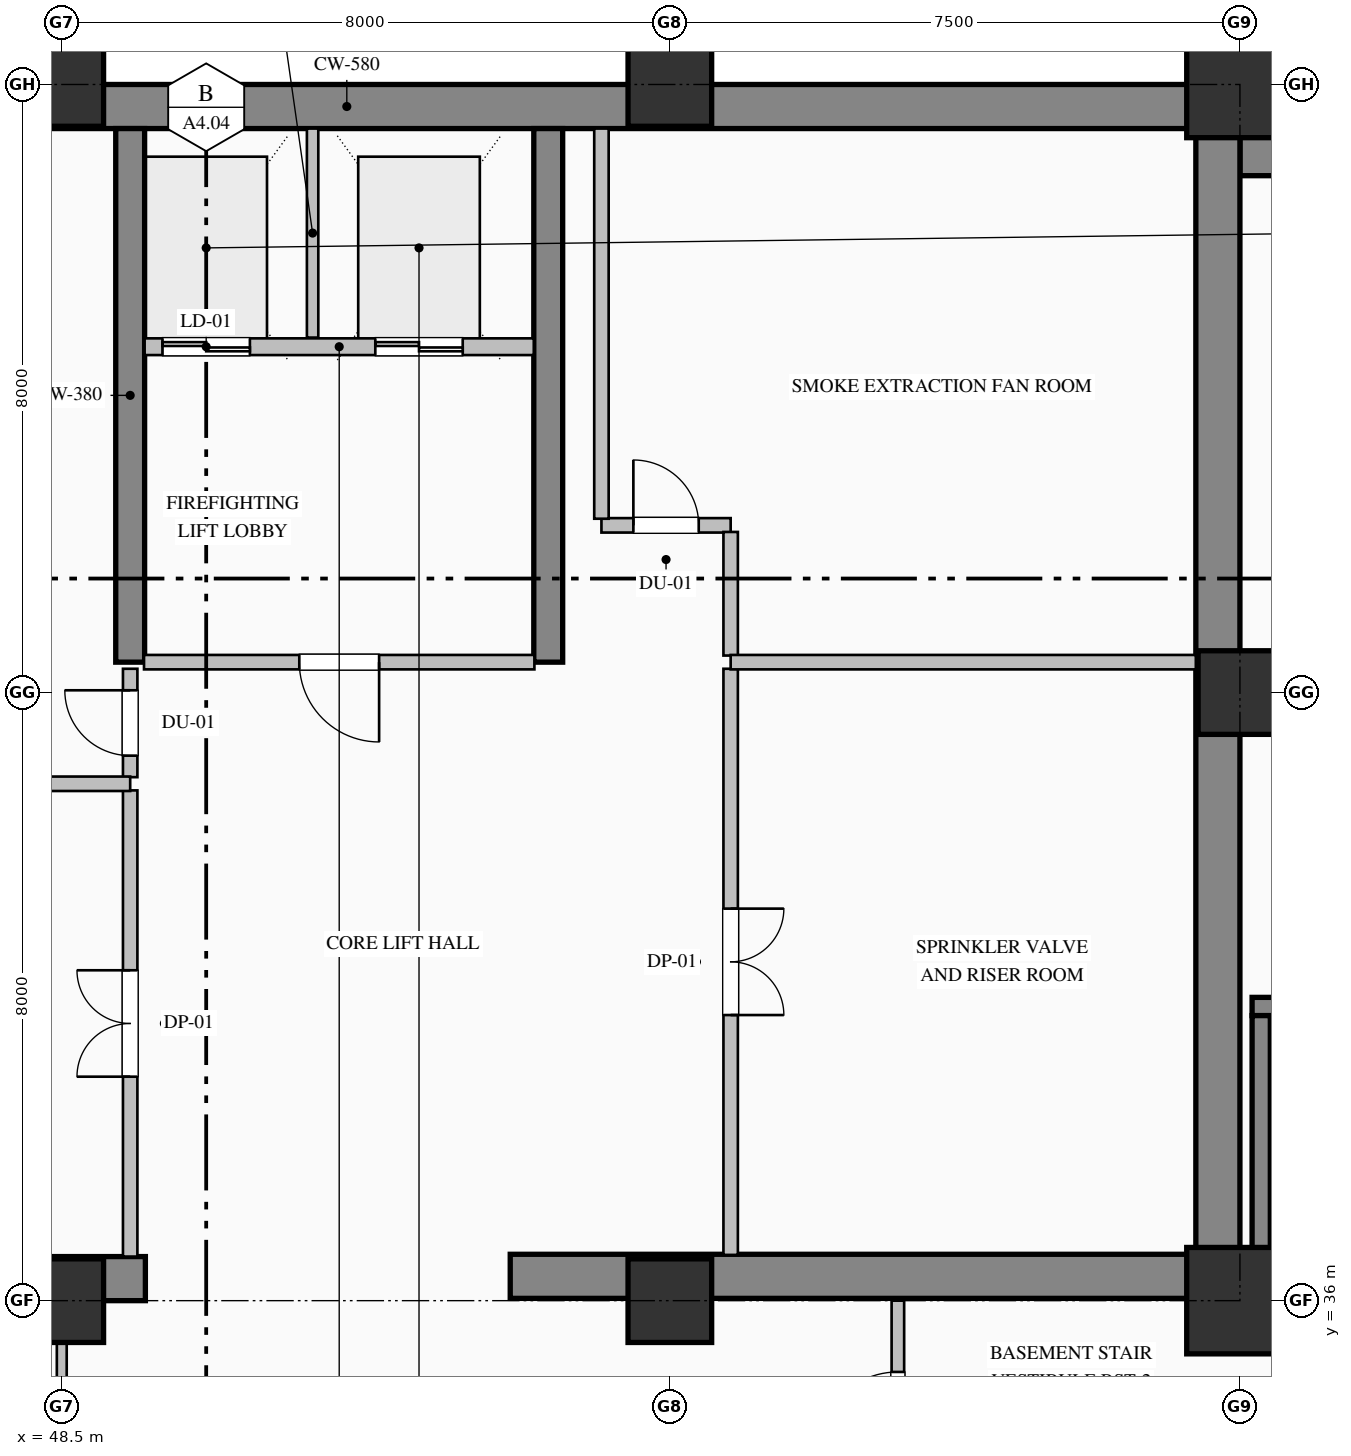
"""IFC4 building model, lengths in metres.
Left out: names, types, materials, properties, quantities, classifications, styles, units other than length and angle.
Written with IfcOpenShell. Run it as: python <this file> out.ifc"""

import sys

from ifc_helpers import new_model, si_unit, direction, frame, frame_2d, origin, origin_2d, place, context, subcontext, project, spatial, rectangle, hollow_rectangle, extrude, element, fill, save


model = new_model("IFC4")
c1 = context("Model", 3, precision=1e-05, world=origin(), true_north=direction((0.0, 1.0)))
c2 = subcontext(c1, "Body", "Model", "MODEL_VIEW")
j1 = project(units=[si_unit("LENGTHUNIT", "METRE"), si_unit("PLANEANGLEUNIT", "RADIAN")], contexts=[c1])
p1 = place(None, origin())
s1 = spatial("IfcSite", under=j1, at=p1, CompositionType="ELEMENT")
p2 = place(p1, origin())
s2 = spatial("IfcBuilding", under=s1, at=p2, CompositionType="ELEMENT")
p3 = place(p2, frame((0.0, 0.0, -13.8)))
s3 = spatial("IfcBuildingStorey", under=s2, at=p3, CompositionType="ELEMENT", Elevation=-13.8)
p4 = place(p3, frame((64.0, 51.4, -0.5), z_axis=(0.0, 0.0, 1.0), x_axis=(1.0, 0.0, 0.0)))
e1 = element("IfcWall", 1, at=p4, inside=s3, PredefinedType="USERDEFINED", context=c2, shape_type="SweptSolid", body=[
    extrude(rectangle(XDim=9.2, YDim=1.2, at=frame_2d((4.6, 0.0))), origin(), (0.0, 0.0, 1.0), 5.1),
])
p5 = place(p3, frame((40.5, 51.71, -0.5), z_axis=(0.0, 0.0, 1.0), x_axis=(1.0, 0.0, 0.0)))
e2 = element("IfcWall", 2, at=p5, inside=s3, PredefinedType="SHEAR", context=c2, shape_type="SweptSolid", body=[
    extrude(rectangle(XDim=23.5, YDim=0.58, at=frame_2d((11.75, 0.0))), origin(), (0.0, 0.0, 1.0), 4.74),
])
p6 = place(p3, frame((63.71, 36.32, -0.5), z_axis=(0.0, 0.0, 1.0), x_axis=(0.0, 1.0, 0.0)))
e3 = element("IfcWall", 3, at=p6, inside=s3, PredefinedType="SHEAR", context=c2, shape_type="SweptSolid", body=[
    extrude(rectangle(XDim=15.1, YDim=0.58, at=frame_2d((7.55, 0.0))), origin(), (0.0, 0.0, 1.0), 4.74),
])
p7 = place(p3, frame((40.5, 36.29, -0.5), z_axis=(0.0, 0.0, 1.0), x_axis=(1.0, 0.0, 0.0)))
e4 = element("IfcWall", 4, at=p7, inside=s3, PredefinedType="SHEAR", context=c2, shape_type="SweptSolid", body=[
    extrude(rectangle(XDim=9.1, YDim=0.58, at=frame_2d((4.55, 0.0))), origin(), (0.0, 0.0, 1.0), 4.74),
])
p8 = place(p3, frame((54.4, 36.32, -0.5), z_axis=(0.0, 0.0, 1.0), x_axis=(1.0, 0.0, 0.0)))
e5 = element("IfcWall", 5, at=p8, inside=s3, PredefinedType="SHEAR", context=c2, shape_type="SweptSolid", body=[
    extrude(rectangle(XDim=9.6, YDim=0.58, at=frame_2d((4.8, 0.0))), origin(), (0.0, 0.0, 1.0), 5.1),
])
for number, where, z_axis, x_axis in (
    (6, (49.4, 44.4, -0.5), (0.0, 0.0, 1.0), (0.0, 1.0, 0.0)),
    (7, (54.9, 44.4, -0.5), (0.0, 0.0, 1.0), (0.0, 1.0, 0.0)),
):
    element("IfcWall", number, at=place(p3, frame(where, z_axis=z_axis, x_axis=x_axis)), inside=s3, PredefinedType="SHEAR", context=c2, shape_type="SweptSolid", body=[
        extrude(rectangle(XDim=7.02, YDim=0.38, at=frame_2d((3.51, 0.0))), origin(), (0.0, 0.0, 1.0), 4.74),
    ])
p9 = place(p3, frame((48.5, 36.0, -0.5), z_axis=(0.0, 0.0, 1.0), x_axis=(1.0, 0.0, 0.0)))
e8 = element("IfcColumn", 8, at=p9, inside=s3, PredefinedType="COLUMN", context=c2, shape_type="SweptSolid", body=[
    extrude(rectangle(XDim=1.1, YDim=1.1, at=origin_2d()), origin(), (0.0, 0.0, 1.0), 5.1),
])
p10 = place(p3, frame((48.5, 52.0, -0.5), z_axis=(0.0, 0.0, 1.0), x_axis=(1.0, 0.0, 0.0)))
e9 = element("IfcColumn", 9, at=p10, inside=s3, PredefinedType="COLUMN", context=c2, shape_type="SweptSolid", body=[
    extrude(hollow_rectangle(XDim=1.1, YDim=1.1, WallThickness=0.04, at=origin_2d()), origin(), (0.0, 0.0, 1.0), 5.1),
])
p11 = place(p3, frame((56.5, 36.0, -0.5), z_axis=(0.0, 0.0, 1.0), x_axis=(1.0, 0.0, 0.0)))
e10 = element("IfcColumn", 10, at=p11, inside=s3, PredefinedType="COLUMN", context=c2, shape_type="SweptSolid", body=[
    extrude(rectangle(XDim=1.1, YDim=1.1, at=origin_2d()), origin(), (0.0, 0.0, 1.0), 5.1),
])
p12 = place(p3, frame((56.5, 52.0, -0.5), z_axis=(0.0, 0.0, 1.0), x_axis=(1.0, 0.0, 0.0)))
e11 = element("IfcColumn", 11, at=p12, inside=s3, PredefinedType="COLUMN", context=c2, shape_type="SweptSolid", body=[
    extrude(hollow_rectangle(XDim=1.1, YDim=1.1, WallThickness=0.04, at=origin_2d()), origin(), (0.0, 0.0, 1.0), 5.1),
])
p13 = place(p3, frame((64.0, 36.0, -0.5), z_axis=(0.0, 0.0, 1.0), x_axis=(1.0, 0.0, 0.0)))
e12 = element("IfcColumn", 12, at=p13, inside=s3, PredefinedType="COLUMN", context=c2, shape_type="SweptSolid", body=[
    extrude(hollow_rectangle(XDim=1.4, YDim=1.4, WallThickness=0.05, at=origin_2d()), origin(), (0.0, 0.0, 1.0), 5.1),
])
p14 = place(p3, frame((64.0, 44.0, -0.5), z_axis=(0.0, 0.0, 1.0), x_axis=(1.0, 0.0, 0.0)))
e13 = element("IfcColumn", 13, at=p14, inside=s3, PredefinedType="COLUMN", context=c2, shape_type="SweptSolid", body=[
    extrude(rectangle(XDim=1.1, YDim=1.1, at=origin_2d()), origin(), (0.0, 0.0, 1.0), 5.1),
])
p15 = place(p3, frame((64.0, 52.0, -0.5), z_axis=(0.0, 0.0, 1.0), x_axis=(1.0, 0.0, 0.0)))
e14 = element("IfcColumn", 14, at=p15, inside=s3, PredefinedType="COLUMN", context=c2, shape_type="SweptSolid", body=[
    extrude(hollow_rectangle(XDim=1.4, YDim=1.4, WallThickness=0.05, at=origin_2d()), origin(), (0.0, 0.0, 1.0), 5.1),
])
p16 = place(p3, frame((64.16, 39.87, -0.5), z_axis=(0.0, 0.0, 1.0), x_axis=(1.0, 0.0, 0.0)))
e15 = element("IfcWall", 15, at=p16, inside=s3, PredefinedType="SOLIDWALL", context=c2, shape_type="SweptSolid", body=[
    extrude(rectangle(XDim=7.82, YDim=0.24, at=frame_2d((3.91, 0.0))), origin(), (0.0, 0.0, 1.0), 5.1),
])
p17 = place(p3, frame((71.98, 36.48, -0.5), z_axis=(0.0, 0.0, 1.0), x_axis=(-1.0, 0.0, 0.0)))
e16 = element("IfcWall", 16, at=p17, inside=s3, PredefinedType="SOLIDWALL", context=c2, shape_type="SweptSolid", body=[
    extrude(rectangle(XDim=7.82, YDim=0.24, at=frame_2d((3.91, 0.0))), origin(), (0.0, 0.0, 1.0), 5.1),
])
p18 = place(p17, frame((6.08, 0.0, 0.5)))
e17 = element("IfcOpeningElement", 17, at=p18, cuts=e16, PredefinedType="OPENING", context=c2, shape_type="SweptSolid", body=[
    extrude(rectangle(XDim=1.15, YDim=2.2, at=frame_2d((0.575, 1.1))), frame((0.0, 0.13, 0.0), z_axis=(0.0, -1.0, 0.0), x_axis=(1.0, 0.0, 0.0)), (0.0, 0.0, 1.0), 0.26),
])
p19 = place(p3, frame((64.28, 39.75, -0.5), z_axis=(0.0, 0.0, 1.0), x_axis=(0.0, -1.0, 0.0)))
e18 = element("IfcWall", 18, at=p19, inside=s3, PredefinedType="SOLIDWALL", context=c2, shape_type="SweptSolid", body=[
    extrude(rectangle(XDim=3.15, YDim=0.24, at=frame_2d((1.575, 0.0))), origin(), (0.0, 0.0, 1.0), 5.1),
])
p20 = place(p3, frame((54.71, 48.55, 0.0), z_axis=(0.0, 0.0, 1.0), x_axis=(-1.0, 0.0, 0.0)))
e19 = element("IfcWall", 19, at=p20, inside=s3, PredefinedType="PARTITIONING", context=c2, shape_type="SweptSolid", body=[
    extrude(rectangle(XDim=5.12, YDim=0.22, at=frame_2d((2.56, 0.0))), origin(), (0.0, 0.0, 1.0), 4.24),
])
p21 = place(p20, frame((3.735, 0.0, 0.0)))
e20 = element("IfcOpeningElement", 20, at=p21, cuts=e19, PredefinedType="OPENING", context=c2, shape_type="SweptSolid", body=[
    extrude(rectangle(XDim=1.15, YDim=2.2, at=frame_2d((0.575, 1.1))), frame((0.0, 0.12, 0.0), z_axis=(0.0, -1.0, 0.0), x_axis=(1.0, 0.0, 0.0)), (0.0, 0.0, 1.0), 0.24),
])
p22 = place(p20, frame((0.935, 0.0, 0.0)))
e21 = element("IfcOpeningElement", 21, at=p22, cuts=e19, PredefinedType="OPENING", context=c2, shape_type="SweptSolid", body=[
    extrude(rectangle(XDim=1.15, YDim=2.2, at=frame_2d((0.575, 1.1))), frame((0.0, 0.12, 0.0), z_axis=(0.0, -1.0, 0.0), x_axis=(1.0, 0.0, 0.0)), (0.0, 0.0, 1.0), 0.24),
])
p23 = place(p3, frame((51.8, 48.67, 0.0), z_axis=(0.0, 0.0, 1.0), x_axis=(0.0, 1.0, 0.0)))
e22 = element("IfcWall", 22, at=p23, inside=s3, PredefinedType="PARTITIONING", context=c2, shape_type="SweptSolid", body=[
    extrude(rectangle(XDim=2.75, YDim=0.15, at=frame_2d((1.375, 0.0))), origin(), (0.0, 0.0, 1.0), 4.24),
])
p24 = place(p3, frame((54.718, 44.4, 0.0), z_axis=(0.0, 0.0, 1.0), x_axis=(-1.0, 0.0, 0.0)))
e23 = element("IfcWall", 23, at=p24, inside=s3, PredefinedType="PARTITIONING", context=c2, shape_type="SweptSolid", body=[
    extrude(rectangle(XDim=5.136, YDim=0.19, at=frame_2d((2.568, 0.0))), origin(), (0.0, 0.0, 1.0), 4.24),
])
p25 = place(p24, frame((2.043, 0.0, 0.0)))
e24 = element("IfcOpeningElement", 24, at=p25, cuts=e23, PredefinedType="OPENING", context=c2, shape_type="SweptSolid", body=[
    extrude(rectangle(XDim=1.05, YDim=2.15, at=frame_2d((0.525, 1.075))), frame((0.0, 0.105, 0.0), z_axis=(0.0, -1.0, 0.0), x_axis=(1.0, 0.0, 0.0)), (0.0, 0.0, 1.0), 0.21),
])
p26 = place(p3, frame((49.4, 36.58, 0.0), z_axis=(0.0, 0.0, 1.0), x_axis=(0.0, 1.0, 0.0)))
e25 = element("IfcWall", 25, at=p26, inside=s3, PredefinedType="PARTITIONING", context=c2, shape_type="SweptSolid", body=[
    extrude(rectangle(XDim=6.133, YDim=0.19, at=frame_2d((3.066, 0.0))), origin(), (0.0, 0.0, 1.0), 3.332),
])
p27 = place(p26, frame((2.366, 0.0, 0.0)))
e26 = element("IfcOpeningElement", 26, at=p27, cuts=e25, PredefinedType="OPENING", context=c2, shape_type="SweptSolid", body=[
    extrude(rectangle(XDim=1.4, YDim=2.25, at=frame_2d((0.7, 1.125))), frame((0.0, 0.105, 0.0), z_axis=(0.0, -1.0, 0.0), x_axis=(1.0, 0.0, 0.0)), (0.0, 0.0, 1.0), 0.21),
])
p28 = place(p3, frame((49.4, 42.887, 0.0), z_axis=(0.0, 0.0, 1.0), x_axis=(0.0, 1.0, 0.0)))
e27 = element("IfcWall", 27, at=p28, inside=s3, PredefinedType="PARTITIONING", context=c2, shape_type="SweptSolid", body=[
    extrude(rectangle(XDim=1.426, YDim=0.19, at=frame_2d((0.713, 0.0))), origin(), (0.0, 0.0, 1.0), 3.332),
])
p29 = place(p28, frame((0.283, 0.0, 0.0)))
e28 = element("IfcOpeningElement", 28, at=p29, cuts=e27, PredefinedType="OPENING", context=c2, shape_type="SweptSolid", body=[
    extrude(rectangle(XDim=0.86, YDim=2.1, at=frame_2d((0.43, 1.05))), frame((0.0, 0.105, 0.0), z_axis=(0.0, -1.0, 0.0), x_axis=(1.0, 0.0, 0.0)), (0.0, 0.0, 1.0), 0.21),
])
p30 = place(p3, frame((57.3, 44.313, 0.0), z_axis=(0.0, 0.0, 1.0), x_axis=(0.0, -1.0, 0.0)))
e29 = element("IfcWall", 29, at=p30, inside=s3, PredefinedType="PARTITIONING", context=c2, shape_type="SweptSolid", body=[
    extrude(rectangle(XDim=7.711, YDim=0.19, at=frame_2d((3.855, 0.0))), origin(), (0.0, 0.0, 1.0), 4.24),
])
p31 = place(p30, frame((3.156, 0.0, 0.0)))
e30 = element("IfcOpeningElement", 30, at=p31, cuts=e29, PredefinedType="OPENING", context=c2, shape_type="SweptSolid", body=[
    extrude(rectangle(XDim=1.4, YDim=2.25, at=frame_2d((0.7, 1.125))), frame((0.0, 0.105, 0.0), z_axis=(0.0, -1.0, 0.0), x_axis=(1.0, 0.0, 0.0)), (0.0, 0.0, 1.0), 0.21),
])
p32 = place(p3, frame((55.6, 46.2, 0.0), z_axis=(0.0, 0.0, 1.0), x_axis=(1.0, 0.0, 0.0)))
e31 = element("IfcWall", 31, at=p32, inside=s3, PredefinedType="PARTITIONING", context=c2, shape_type="SweptSolid", body=[
    extrude(rectangle(XDim=1.7, YDim=0.19, at=frame_2d((0.85, 0.0))), origin(), (0.0, 0.0, 1.0), 4.24),
])
p33 = place(p32, frame((0.42, 0.0, 0.0)))
e32 = element("IfcOpeningElement", 32, at=p33, cuts=e31, PredefinedType="OPENING", context=c2, shape_type="SweptSolid", body=[
    extrude(rectangle(XDim=0.86, YDim=2.1, at=frame_2d((0.43, 1.05))), frame((0.0, 0.105, 0.0), z_axis=(0.0, -1.0, 0.0), x_axis=(1.0, 0.0, 0.0)), (0.0, 0.0, 1.0), 0.21),
])
p34 = place(p3, frame((57.3, 46.113, 0.0), z_axis=(0.0, 0.0, 1.0), x_axis=(0.0, -1.0, 0.0)))
e33 = element("IfcWall", 33, at=p34, inside=s3, PredefinedType="PARTITIONING", context=c2, shape_type="SweptSolid", body=[
    extrude(rectangle(XDim=1.626, YDim=0.19, at=frame_2d((0.813, 0.0))), origin(), (0.0, 0.0, 1.0), 4.24),
])
p35 = place(p3, frame((41.08, 42.8, 0.0), z_axis=(0.0, 0.0, 1.0), x_axis=(1.0, 0.0, 0.0)))
e34 = element("IfcWall", 34, at=p35, inside=s3, PredefinedType="PARTITIONING", context=c2, shape_type="SweptSolid", body=[
    extrude(rectangle(XDim=8.32, YDim=0.19, at=frame_2d((4.16, 0.0))), origin(), (0.0, 0.0, 1.0), 4.24),
])
p36 = place(p3, frame((57.3, 44.4, 0.0), z_axis=(0.0, 0.0, 1.0), x_axis=(1.0, 0.0, 0.0)))
e35 = element("IfcWall", 35, at=p36, inside=s3, PredefinedType="PARTITIONING", context=c2, shape_type="SweptSolid", body=[
    extrude(rectangle(XDim=6.12, YDim=0.19, at=frame_2d((3.06, 0.0))), origin(), (0.0, 0.0, 1.0), 4.24),
])
p37 = place(p3, frame((55.6, 46.287, 0.0), z_axis=(0.0, 0.0, 1.0), x_axis=(0.0, 1.0, 0.0)))
e36 = element("IfcWall", 36, at=p37, inside=s3, PredefinedType="PARTITIONING", context=c2, shape_type="SweptSolid", body=[
    extrude(rectangle(XDim=5.133, YDim=0.19, at=frame_2d((2.566, 0.0))), origin(), (0.0, 0.0, 1.0), 4.24),
])
p38 = place(p3, frame((59.5, 33.074, 0.0), z_axis=(0.0, 0.0, 1.0), x_axis=(0.0, 1.0, 0.0)))
e37 = element("IfcWall", 37, at=p38, inside=s3, PredefinedType="PARTITIONING", context=c2, shape_type="SweptSolid", body=[
    extrude(rectangle(XDim=2.926, YDim=0.165, at=frame_2d((1.463, 0.0))), origin(), (0.0, 0.0, 1.0), 4.24),
])
p39 = place(p38, frame((0.938, 0.0, 0.0)))
e38 = element("IfcOpeningElement", 38, at=p39, cuts=e37, PredefinedType="OPENING", context=c2, shape_type="SweptSolid", body=[
    extrude(rectangle(XDim=1.05, YDim=2.15, at=frame_2d((0.525, 1.075))), frame((0.0, 0.093, 0.0), z_axis=(0.0, -1.0, 0.0), x_axis=(1.0, 0.0, 0.0)), (0.0, 0.0, 1.0), 0.185),
])
p40 = place(p3, frame((48.5, 32.574, 0.0), z_axis=(0.0, 0.0, 1.0), x_axis=(0.0, 1.0, 0.0)))
e39 = element("IfcWall", 39, at=p40, inside=s3, PredefinedType="PARTITIONING", context=c2, shape_type="SweptSolid", body=[
    extrude(rectangle(XDim=3.426, YDim=0.13, at=frame_2d((1.713, 0.0))), origin(), (0.0, 0.0, 1.0), 3.332),
])
p41 = place(p21, origin())
e40 = element("IfcDoor", 40, at=p41, inside=s3, OperationType="DOUBLE_DOOR_SLIDING", PredefinedType="DOOR", context=c2, shape_type="SweptSolid", body=[
    extrude(rectangle(XDim=1.15, YDim=2.2, at=frame_2d((0.575, 1.1))), frame((0.0, 0.025, 0.0), z_axis=(0.0, -1.0, 0.0), x_axis=(1.0, 0.0, 0.0)), (0.0, 0.0, 1.0), 0.05),
])
fill(e20, e40)
p42 = place(p22, origin())
e41 = element("IfcDoor", 41, at=p42, inside=s3, OperationType="DOUBLE_DOOR_SLIDING", PredefinedType="DOOR", context=c2, shape_type="SweptSolid", body=[
    extrude(rectangle(XDim=1.15, YDim=2.2, at=frame_2d((0.575, 1.1))), frame((0.0, 0.025, 0.0), z_axis=(0.0, -1.0, 0.0), x_axis=(1.0, 0.0, 0.0)), (0.0, 0.0, 1.0), 0.05),
])
fill(e21, e41)
p43 = place(p25, origin())
e42 = element("IfcDoor", 42, at=p43, inside=s3, OperationType="SINGLE_SWING_LEFT", PredefinedType="DOOR", context=c2, shape_type="SweptSolid", body=[
    extrude(rectangle(XDim=1.05, YDim=2.15, at=frame_2d((0.525, 1.075))), frame((0.0, 0.025, 0.0), z_axis=(0.0, -1.0, 0.0), x_axis=(1.0, 0.0, 0.0)), (0.0, 0.0, 1.0), 0.05),
])
fill(e24, e42)
p44 = place(p39, origin())
e43 = element("IfcDoor", 43, at=p44, inside=s3, OperationType="SINGLE_SWING_LEFT", PredefinedType="DOOR", context=c2, shape_type="SweptSolid", body=[
    extrude(rectangle(XDim=1.05, YDim=2.15, at=frame_2d((0.525, 1.075))), frame((0.0, 0.025, 0.0), z_axis=(0.0, -1.0, 0.0), x_axis=(1.0, 0.0, 0.0)), (0.0, 0.0, 1.0), 0.05),
])
fill(e38, e43)
p45 = place(p27, origin())
e44 = element("IfcDoor", 44, at=p45, inside=s3, OperationType="DOUBLE_DOOR_SINGLE_SWING", PredefinedType="DOOR", context=c2, shape_type="SweptSolid", body=[
    extrude(rectangle(XDim=1.4, YDim=2.25, at=frame_2d((0.7, 1.125))), frame((0.0, 0.025, 0.0), z_axis=(0.0, -1.0, 0.0), x_axis=(1.0, 0.0, 0.0)), (0.0, 0.0, 1.0), 0.05),
])
fill(e26, e44)
p46 = place(p29, origin())
e45 = element("IfcDoor", 45, at=p46, inside=s3, OperationType="SINGLE_SWING_RIGHT", PredefinedType="DOOR", context=c2, shape_type="SweptSolid", body=[
    extrude(rectangle(XDim=0.86, YDim=2.1, at=frame_2d((0.43, 1.05))), frame((0.0, 0.025, 0.0), z_axis=(0.0, -1.0, 0.0), x_axis=(1.0, 0.0, 0.0)), (0.0, 0.0, 1.0), 0.05),
])
fill(e28, e45)
p47 = place(p31, origin())
e46 = element("IfcDoor", 46, at=p47, inside=s3, OperationType="DOUBLE_DOOR_SINGLE_SWING", PredefinedType="DOOR", context=c2, shape_type="SweptSolid", body=[
    extrude(rectangle(XDim=1.4, YDim=2.25, at=frame_2d((0.7, 1.125))), frame((0.0, 0.025, 0.0), z_axis=(0.0, -1.0, 0.0), x_axis=(1.0, 0.0, 0.0)), (0.0, 0.0, 1.0), 0.05),
])
fill(e30, e46)
p48 = place(p33, origin())
e47 = element("IfcDoor", 47, at=p48, inside=s3, OperationType="SINGLE_SWING_LEFT", PredefinedType="DOOR", context=c2, shape_type="SweptSolid", body=[
    extrude(rectangle(XDim=0.86, YDim=2.1, at=frame_2d((0.43, 1.05))), frame((0.0, 0.025, 0.0), z_axis=(0.0, -1.0, 0.0), x_axis=(1.0, 0.0, 0.0)), (0.0, 0.0, 1.0), 0.05),
])
fill(e32, e47)
save(model, sys.argv[1])
